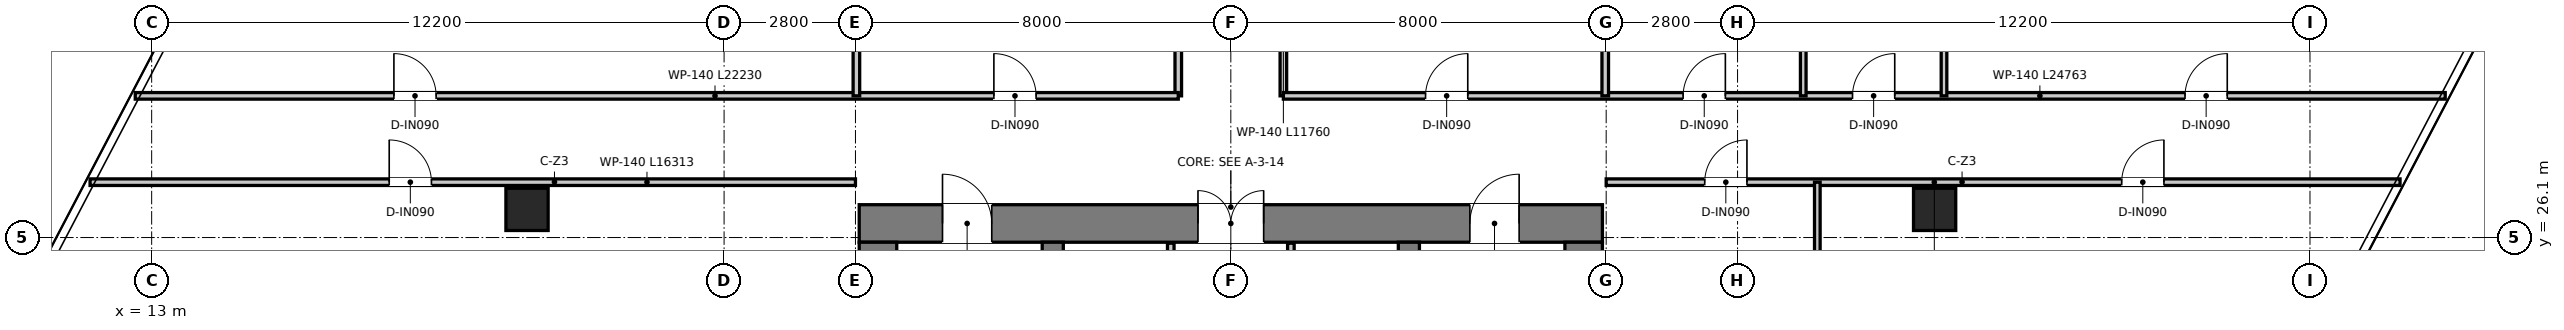
"""IFC4 building model, lengths in metres.
Left out: names, types, materials, properties, quantities, classifications, styles, units other than length and angle.
Written with IfcOpenShell. Run it as: python <this file> out.ifc"""

import sys

from ifc_helpers import new_model, si_unit, direction, frame, frame_2d, origin, origin_2d, place, context, subcontext, project, spatial, rectangle, extrude, source, transform, mapped, element, fill, save


model = new_model("IFC4")
c1 = context("Model", 3, precision=1e-05, world=origin(), true_north=direction((0.0, 1.0)))
c2 = subcontext(c1, "Body", "Model", "MODEL_VIEW")
j1 = project(units=[si_unit("LENGTHUNIT", "METRE"), si_unit("PLANEANGLEUNIT", "RADIAN")], contexts=[c1])
p1 = place(None, origin())
s1 = spatial("IfcSite", under=j1, at=p1, CompositionType="ELEMENT")
p2 = place(p1, origin())
s2 = spatial("IfcBuilding", under=s1, at=p2, CompositionType="ELEMENT")
p3 = place(p2, frame((0.0, 0.0, 154.1)))
s3 = spatial("IfcBuildingStorey", under=s2, at=p3, CompositionType="ELEMENT", Elevation=154.1)
p4 = place(p3, frame((28.08, 26.4, 0.0), z_axis=(0.0, 0.0, 1.0), x_axis=(1.0, 0.0, 0.0)))
e1 = element("IfcWall", 1, at=p4, inside=s3, PredefinedType="SHEAR", context=c2, shape_type="SweptSolid", body=[
    extrude(rectangle(XDim=15.84, YDim=0.8, at=frame_2d((7.92, 0.0))), origin(), (0.0, 0.0, 1.0), 3.95),
])
p5 = place(p4, frame((7.22, 0.0, 0.0)))
e2 = element("IfcOpeningElement", 2, at=p5, cuts=e1, PredefinedType="OPENING", context=c2, shape_type="SweptSolid", body=[
    extrude(rectangle(XDim=1.4, YDim=2.2, at=frame_2d((0.7, 1.1))), frame((0.0, 0.41, 0.0), z_axis=(0.0, -1.0, 0.0), x_axis=(1.0, 0.0, 0.0)), (0.0, 0.0, 1.0), 0.82),
])
p6 = place(p4, frame((1.775, 0.0, 0.0)))
e3 = element("IfcOpeningElement", 3, at=p6, cuts=e1, PredefinedType="OPENING", context=c2, shape_type="SweptSolid", body=[
    extrude(rectangle(XDim=1.05, YDim=2.1, at=frame_2d((0.525, 1.05))), frame((0.0, 0.41, 0.0), z_axis=(0.0, -1.0, 0.0), x_axis=(1.0, 0.0, 0.0)), (0.0, 0.0, 1.0), 0.82),
])
p7 = place(p4, frame((13.015, 0.0, 0.0)))
e4 = element("IfcOpeningElement", 4, at=p7, cuts=e1, PredefinedType="OPENING", context=c2, shape_type="SweptSolid", body=[
    extrude(rectangle(XDim=1.05, YDim=2.1, at=frame_2d((0.525, 1.05))), frame((0.0, 0.41, 0.0), z_axis=(0.0, -1.0, 0.0), x_axis=(1.0, 0.0, 0.0)), (0.0, 0.0, 1.0), 0.82),
])
for number, where, z_axis, x_axis in (
    (5, (28.48, 11.3, 0.0), (0.0, 0.0, 1.0), (0.0, 1.0, 0.0)),
    (6, (43.52, 11.3, 0.0), (0.0, 0.0, 1.0), (0.0, 1.0, 0.0)),
):
    element("IfcWall", number, at=place(p3, frame(where, z_axis=z_axis, x_axis=x_axis)), inside=s3, PredefinedType="SHEAR", context=c2, shape_type="SweptSolid", body=[
        extrude(rectangle(XDim=14.7, YDim=0.8, at=frame_2d((7.35, 0.0))), origin(), (0.0, 0.0, 1.0), 3.95),
    ])
p8 = place(p3, frame((32.205, 13.22, 0.0), z_axis=(0.0, 0.0, 1.0), x_axis=(0.0, 1.0, 0.0)))
e7 = element("IfcWall", 7, at=p8, inside=s3, PredefinedType="SHEAR", context=c2, shape_type="SweptSolid", body=[
    extrude(rectangle(XDim=12.78, YDim=0.45, at=frame_2d((6.39, 0.0))), origin(), (0.0, 0.0, 1.0), 3.95),
])
p9 = place(p8, frame((10.58, 0.0, 0.0)))
e8 = element("IfcOpeningElement", 8, at=p9, cuts=e7, PredefinedType="OPENING", context=c2, shape_type="SweptSolid", body=[
    extrude(rectangle(XDim=1.1, YDim=2.15, at=frame_2d((0.55, 1.075))), frame((0.0, 0.235, 0.0), z_axis=(0.0, -1.0, 0.0), x_axis=(1.0, 0.0, 0.0)), (0.0, 0.0, 1.0), 0.47),
])
p10 = place(p3, frame((39.795, 13.22, 0.0), z_axis=(0.0, 0.0, 1.0), x_axis=(0.0, 1.0, 0.0)))
e9 = element("IfcWall", 9, at=p10, inside=s3, PredefinedType="SHEAR", context=c2, shape_type="SweptSolid", body=[
    extrude(rectangle(XDim=12.78, YDim=0.45, at=frame_2d((6.39, 0.0))), origin(), (0.0, 0.0, 1.0), 3.95),
])
p11 = place(p10, frame((10.58, 0.0, 0.0)))
e10 = element("IfcOpeningElement", 10, at=p11, cuts=e9, PredefinedType="OPENING", context=c2, shape_type="SweptSolid", body=[
    extrude(rectangle(XDim=1.1, YDim=2.15, at=frame_2d((0.55, 1.075))), frame((0.0, 0.235, 0.0), z_axis=(0.0, -1.0, 0.0), x_axis=(1.0, 0.0, 0.0)), (0.0, 0.0, 1.0), 0.47),
])
m1 = source(origin(), c2, "Body", "SweptSolid", [
    extrude(rectangle(XDim=0.9, YDim=0.9, at=origin_2d()), origin(), (0.0, 0.0, 1.0), 3.95),
])
for number, where, z_axis, x_axis in (
    (11, (21.0, 26.7, 0.0), (0.0, 0.0, 1.0), (1.0, 0.0, 0.0)),
    (12, (51.0, 26.7, 0.0), (0.0, 0.0, 1.0), (1.0, 0.0, 0.0)),
):
    element("IfcColumn", number, at=place(p3, frame(where, z_axis=z_axis, x_axis=x_axis)), inside=s3, PredefinedType="COLUMN", context=c2, shape_type="MappedRepresentation", body=[
        mapped(m1, transform((0.0, 0.0, 0.0), x_axis=(1.0, 0.0, 0.0), y_axis=(0.0, 1.0, 0.0), z_axis=(0.0, 0.0, 1.0), scale=1.0)),
    ])
p12 = place(p3, frame((34.72, 20.2, 0.0), z_axis=(0.0, 0.0, 1.0), x_axis=(0.0, 1.0, 0.0)))
e13 = element("IfcWall", 13, at=p12, inside=s3, PredefinedType="PARTITIONING", context=c2, shape_type="SweptSolid", body=[
    extrude(rectangle(XDim=5.78, YDim=0.14, at=frame_2d((2.89, 0.0))), origin(), (0.0, 0.0, 1.0), 2.67),
])
p13 = place(p12, frame((1.05, 0.0, 0.0)))
e14 = element("IfcOpeningElement", 14, at=p13, cuts=e13, PredefinedType="OPENING", context=c2, shape_type="SweptSolid", body=[
    extrude(rectangle(XDim=0.9, YDim=2.1, at=frame_2d((0.45, 1.05))), frame((0.0, 0.08, 0.0), z_axis=(0.0, -1.0, 0.0), x_axis=(1.0, 0.0, 0.0)), (0.0, 0.0, 1.0), 0.16),
])
p14 = place(p3, frame((37.28, 20.2, 0.0), z_axis=(0.0, 0.0, 1.0), x_axis=(0.0, 1.0, 0.0)))
e15 = element("IfcWall", 15, at=p14, inside=s3, PredefinedType="PARTITIONING", context=c2, shape_type="SweptSolid", body=[
    extrude(rectangle(XDim=5.78, YDim=0.14, at=frame_2d((2.89, 0.0))), origin(), (0.0, 0.0, 1.0), 2.67),
])
p15 = place(p14, frame((0.95, 0.0, 0.0)))
e16 = element("IfcOpeningElement", 16, at=p15, cuts=e15, PredefinedType="OPENING", context=c2, shape_type="SweptSolid", body=[
    extrude(rectangle(XDim=1.1, YDim=2.15, at=frame_2d((0.55, 1.075))), frame((0.0, 0.08, 0.0), z_axis=(0.0, -1.0, 0.0), x_axis=(1.0, 0.0, 0.0)), (0.0, 0.0, 1.0), 0.16),
])
p16 = place(p3, frame((34.88, 29.12, 0.0), z_axis=(0.0, 0.0, 1.0), x_axis=(0.0, 1.0, 0.0)))
e17 = element("IfcWall", 17, at=p16, inside=s3, PredefinedType="PARTITIONING", context=c2, shape_type="SweptSolid", body=[
    extrude(rectangle(XDim=11.76, YDim=0.14, at=frame_2d((5.88, 0.0))), origin(), (0.0, 0.0, 1.0), 3.03),
])
p17 = place(p16, frame((3.205, 0.0, 0.0)))
e18 = element("IfcOpeningElement", 18, at=p17, cuts=e17, PredefinedType="OPENING", context=c2, shape_type="SweptSolid", body=[
    extrude(rectangle(XDim=0.95, YDim=2.1, at=frame_2d((0.475, 1.05))), frame((0.0, 0.08, 0.0), z_axis=(0.0, -1.0, 0.0), x_axis=(1.0, 0.0, 0.0)), (0.0, 0.0, 1.0), 0.16),
])
p18 = place(p16, frame((8.02, 0.0, 0.0)))
e19 = element("IfcOpeningElement", 19, at=p18, cuts=e17, PredefinedType="OPENING", context=c2, shape_type="SweptSolid", body=[
    extrude(rectangle(XDim=0.9, YDim=2.1, at=frame_2d((0.45, 1.05))), frame((0.0, 0.08, 0.0), z_axis=(0.0, -1.0, 0.0), x_axis=(1.0, 0.0, 0.0)), (0.0, 0.0, 1.0), 0.16),
])
p19 = place(p3, frame((37.12, 29.12, 0.0), z_axis=(0.0, 0.0, 1.0), x_axis=(0.0, 1.0, 0.0)))
e20 = element("IfcWall", 20, at=p19, inside=s3, PredefinedType="PARTITIONING", context=c2, shape_type="SweptSolid", body=[
    extrude(rectangle(XDim=11.76, YDim=0.14, at=frame_2d((5.88, 0.0))), origin(), (0.0, 0.0, 1.0), 3.03),
])
p20 = place(p19, frame((4.085, 0.0, 0.0)))
e21 = element("IfcOpeningElement", 21, at=p20, cuts=e20, PredefinedType="OPENING", context=c2, shape_type="SweptSolid", body=[
    extrude(rectangle(XDim=0.95, YDim=2.1, at=frame_2d((0.475, 1.05))), frame((0.0, 0.08, 0.0), z_axis=(0.0, -1.0, 0.0), x_axis=(1.0, 0.0, 0.0)), (0.0, 0.0, 1.0), 0.16),
])
p21 = place(p19, frame((8.02, 0.0, 0.0)))
e22 = element("IfcOpeningElement", 22, at=p21, cuts=e20, PredefinedType="OPENING", context=c2, shape_type="SweptSolid", body=[
    extrude(rectangle(XDim=0.9, YDim=2.1, at=frame_2d((0.45, 1.05))), frame((0.0, 0.08, 0.0), z_axis=(0.0, -1.0, 0.0), x_axis=(1.0, 0.0, 0.0)), (0.0, 0.0, 1.0), 0.16),
])
p22 = place(p3, frame((12.65, 29.12, 0.0), z_axis=(0.0, 0.0, 1.0), x_axis=(1.0, 0.0, 0.0)))
e23 = element("IfcWall", 23, at=p22, inside=s3, PredefinedType="PARTITIONING", context=c2, shape_type="SweptSolid", body=[
    extrude(rectangle(XDim=22.229, YDim=0.14, at=frame_2d((11.115, 0.0))), origin(), (0.0, 0.0, 1.0), 3.03),
])
p23 = place(p22, frame((18.3, 0.0, 0.0)))
e24 = element("IfcOpeningElement", 24, at=p23, cuts=e23, PredefinedType="OPENING", context=c2, shape_type="SweptSolid", body=[
    extrude(rectangle(XDim=0.9, YDim=2.1, at=frame_2d((0.45, 1.05))), frame((0.0, 0.08, 0.0), z_axis=(0.0, -1.0, 0.0), x_axis=(1.0, 0.0, 0.0)), (0.0, 0.0, 1.0), 0.16),
])
p24 = place(p22, frame((5.513, 0.0, 0.0)))
e25 = element("IfcOpeningElement", 25, at=p24, cuts=e23, PredefinedType="OPENING", context=c2, shape_type="SweptSolid", body=[
    extrude(rectangle(XDim=0.9, YDim=2.1, at=frame_2d((0.45, 1.05))), frame((0.0, 0.08, 0.0), z_axis=(0.0, -1.0, 0.0), x_axis=(1.0, 0.0, 0.0)), (0.0, 0.0, 1.0), 0.16),
])
p25 = place(p3, frame((37.12, 29.12, 0.0), z_axis=(0.0, 0.0, 1.0), x_axis=(1.0, 0.0, 0.0)))
e26 = element("IfcWall", 26, at=p25, inside=s3, PredefinedType="PARTITIONING", context=c2, shape_type="SweptSolid", body=[
    extrude(rectangle(XDim=24.763, YDim=0.14, at=frame_2d((12.381, 0.0))), origin(), (0.0, 0.0, 1.0), 3.03),
])
p26 = place(p25, frame((3.03, 0.0, 0.0)))
e27 = element("IfcOpeningElement", 27, at=p26, cuts=e26, PredefinedType="OPENING", context=c2, shape_type="SweptSolid", body=[
    extrude(rectangle(XDim=0.9, YDim=2.1, at=frame_2d((0.45, 1.05))), frame((0.0, 0.08, 0.0), z_axis=(0.0, -1.0, 0.0), x_axis=(1.0, 0.0, 0.0)), (0.0, 0.0, 1.0), 0.16),
])
p27 = place(p25, frame((8.52, 0.0, 0.0)))
e28 = element("IfcOpeningElement", 28, at=p27, cuts=e26, PredefinedType="OPENING", context=c2, shape_type="SweptSolid", body=[
    extrude(rectangle(XDim=0.9, YDim=2.1, at=frame_2d((0.45, 1.05))), frame((0.0, 0.08, 0.0), z_axis=(0.0, -1.0, 0.0), x_axis=(1.0, 0.0, 0.0)), (0.0, 0.0, 1.0), 0.16),
])
p28 = place(p25, frame((12.13, 0.0, 0.0)))
e29 = element("IfcOpeningElement", 29, at=p28, cuts=e26, PredefinedType="OPENING", context=c2, shape_type="SweptSolid", body=[
    extrude(rectangle(XDim=0.9, YDim=2.1, at=frame_2d((0.45, 1.05))), frame((0.0, 0.08, 0.0), z_axis=(0.0, -1.0, 0.0), x_axis=(1.0, 0.0, 0.0)), (0.0, 0.0, 1.0), 0.16),
])
p29 = place(p25, frame((19.217, 0.0, 0.0)))
e30 = element("IfcOpeningElement", 30, at=p29, cuts=e26, PredefinedType="OPENING", context=c2, shape_type="SweptSolid", body=[
    extrude(rectangle(XDim=0.9, YDim=2.1, at=frame_2d((0.45, 1.05))), frame((0.0, 0.08, 0.0), z_axis=(0.0, -1.0, 0.0), x_axis=(1.0, 0.0, 0.0)), (0.0, 0.0, 1.0), 0.16),
])
p30 = place(p3, frame((11.687, 27.28, 0.0), z_axis=(0.0, 0.0, 1.0), x_axis=(1.0, 0.0, 0.0)))
e31 = element("IfcWall", 31, at=p30, inside=s3, PredefinedType="PARTITIONING", context=c2, shape_type="SweptSolid", body=[
    extrude(rectangle(XDim=16.313, YDim=0.14, at=frame_2d((8.156, 0.0))), origin(), (0.0, 0.0, 1.0), 3.03),
])
p31 = place(p30, frame((6.376, 0.0, 0.0)))
e32 = element("IfcOpeningElement", 32, at=p31, cuts=e31, PredefinedType="OPENING", context=c2, shape_type="SweptSolid", body=[
    extrude(rectangle(XDim=0.9, YDim=2.1, at=frame_2d((0.45, 1.05))), frame((0.0, 0.08, 0.0), z_axis=(0.0, -1.0, 0.0), x_axis=(1.0, 0.0, 0.0)), (0.0, 0.0, 1.0), 0.16),
])
p32 = place(p3, frame((44.0, 27.28, 0.0), z_axis=(0.0, 0.0, 1.0), x_axis=(1.0, 0.0, 0.0)))
e33 = element("IfcWall", 33, at=p32, inside=s3, PredefinedType="PARTITIONING", context=c2, shape_type="SweptSolid", body=[
    extrude(rectangle(XDim=16.92, YDim=0.14, at=frame_2d((8.46, 0.0))), origin(), (0.0, 0.0, 1.0), 3.03),
])
p33 = place(p32, frame((2.1, 0.0, 0.0)))
e34 = element("IfcOpeningElement", 34, at=p33, cuts=e33, PredefinedType="OPENING", context=c2, shape_type="SweptSolid", body=[
    extrude(rectangle(XDim=0.9, YDim=2.1, at=frame_2d((0.45, 1.05))), frame((0.0, 0.08, 0.0), z_axis=(0.0, -1.0, 0.0), x_axis=(1.0, 0.0, 0.0)), (0.0, 0.0, 1.0), 0.16),
])
p34 = place(p32, frame((10.987, 0.0, 0.0)))
e35 = element("IfcOpeningElement", 35, at=p34, cuts=e33, PredefinedType="OPENING", context=c2, shape_type="SweptSolid", body=[
    extrude(rectangle(XDim=0.9, YDim=2.1, at=frame_2d((0.45, 1.05))), frame((0.0, 0.08, 0.0), z_axis=(0.0, -1.0, 0.0), x_axis=(1.0, 0.0, 0.0)), (0.0, 0.0, 1.0), 0.16),
])
for number, where, z_axis, x_axis in (
    (36, (28.02, 29.12, 0.0), (0.0, 0.0, 1.0), (0.0, 1.0, 0.0)),
    (37, (43.98, 29.12, 0.0), (0.0, 0.0, 1.0), (0.0, 1.0, 0.0)),
):
    element("IfcWall", number, at=place(p3, frame(where, z_axis=z_axis, x_axis=x_axis)), inside=s3, PredefinedType="PARTITIONING", context=c2, shape_type="SweptSolid", body=[
        extrude(rectangle(XDim=5.46, YDim=0.14, at=frame_2d((2.73, 0.0))), origin(), (0.0, 0.0, 1.0), 3.31),
    ])
p35 = place(p3, frame((48.2, 29.12, 0.0), z_axis=(0.0, 0.0, 1.0), x_axis=(0.0, 1.0, 0.0)))
e38 = element("IfcWall", 38, at=p35, inside=s3, PredefinedType="PARTITIONING", context=c2, shape_type="SweptSolid", body=[
    extrude(rectangle(XDim=15.811, YDim=0.12, at=frame_2d((7.906, 0.0))), origin(), (0.0, 0.0, 1.0), 3.08),
])
p36 = place(p3, frame((51.2, 29.12, 0.0), z_axis=(0.0, 0.0, 1.0), x_axis=(0.0, 1.0, 0.0)))
e39 = element("IfcWall", 39, at=p36, inside=s3, PredefinedType="PARTITIONING", context=c2, shape_type="SweptSolid", body=[
    extrude(rectangle(XDim=14.241, YDim=0.12, at=frame_2d((7.121, 0.0))), origin(), (0.0, 0.0, 1.0), 3.28),
])
p37 = place(p3, frame((48.5, 3.548, 0.0), z_axis=(0.0, 0.0, 1.0), x_axis=(0.0, 1.0, 0.0)))
e40 = element("IfcWall", 40, at=p37, inside=s3, PredefinedType="PARTITIONING", context=c2, shape_type="SweptSolid", body=[
    extrude(rectangle(XDim=23.732, YDim=0.12, at=frame_2d((11.866, 0.0))), origin(), (0.0, 0.0, 1.0), 3.08),
])
p38 = place(p5, origin())
e41 = element("IfcDoor", 41, at=p38, inside=s3, OperationType="DOUBLE_DOOR_SINGLE_SWING", PredefinedType="DOOR", context=c2, shape_type="SweptSolid", body=[
    extrude(rectangle(XDim=1.4, YDim=2.2, at=frame_2d((0.7, 1.1))), frame((0.0, 0.025, 0.0), z_axis=(0.0, -1.0, 0.0), x_axis=(1.0, 0.0, 0.0)), (0.0, 0.0, 1.0), 0.05),
])
fill(e2, e41)
p39 = place(p6, origin())
e42 = element("IfcDoor", 42, at=p39, inside=s3, OperationType="SINGLE_SWING_LEFT", PredefinedType="DOOR", context=c2, shape_type="SweptSolid", body=[
    extrude(rectangle(XDim=1.05, YDim=2.1, at=frame_2d((0.525, 1.05))), frame((0.0, 0.025, 0.0), z_axis=(0.0, -1.0, 0.0), x_axis=(1.0, 0.0, 0.0)), (0.0, 0.0, 1.0), 0.05),
])
fill(e3, e42)
p40 = place(p7, origin())
e43 = element("IfcDoor", 43, at=p40, inside=s3, OperationType="SINGLE_SWING_RIGHT", PredefinedType="DOOR", context=c2, shape_type="SweptSolid", body=[
    extrude(rectangle(XDim=1.05, YDim=2.1, at=frame_2d((0.525, 1.05))), frame((0.0, 0.025, 0.0), z_axis=(0.0, -1.0, 0.0), x_axis=(1.0, 0.0, 0.0)), (0.0, 0.0, 1.0), 0.05),
])
fill(e4, e43)
p41 = place(p23, origin())
e44 = element("IfcDoor", 44, at=p41, inside=s3, OperationType="SINGLE_SWING_LEFT", PredefinedType="DOOR", context=c2, shape_type="SweptSolid", body=[
    extrude(rectangle(XDim=0.9, YDim=2.1, at=frame_2d((0.45, 1.05))), frame((0.0, 0.025, 0.0), z_axis=(0.0, -1.0, 0.0), x_axis=(1.0, 0.0, 0.0)), (0.0, 0.0, 1.0), 0.05),
])
fill(e24, e44)
p42 = place(p26, origin())
e45 = element("IfcDoor", 45, at=p42, inside=s3, OperationType="SINGLE_SWING_RIGHT", PredefinedType="DOOR", context=c2, shape_type="SweptSolid", body=[
    extrude(rectangle(XDim=0.9, YDim=2.1, at=frame_2d((0.45, 1.05))), frame((0.0, 0.025, 0.0), z_axis=(0.0, -1.0, 0.0), x_axis=(1.0, 0.0, 0.0)), (0.0, 0.0, 1.0), 0.05),
])
fill(e27, e45)
p43 = place(p24, origin())
e46 = element("IfcDoor", 46, at=p43, inside=s3, OperationType="SINGLE_SWING_LEFT", PredefinedType="DOOR", context=c2, shape_type="SweptSolid", body=[
    extrude(rectangle(XDim=0.9, YDim=2.1, at=frame_2d((0.45, 1.05))), frame((0.0, 0.025, 0.0), z_axis=(0.0, -1.0, 0.0), x_axis=(1.0, 0.0, 0.0)), (0.0, 0.0, 1.0), 0.05),
])
fill(e25, e46)
p44 = place(p27, origin())
e47 = element("IfcDoor", 47, at=p44, inside=s3, OperationType="SINGLE_SWING_RIGHT", PredefinedType="DOOR", context=c2, shape_type="SweptSolid", body=[
    extrude(rectangle(XDim=0.9, YDim=2.1, at=frame_2d((0.45, 1.05))), frame((0.0, 0.025, 0.0), z_axis=(0.0, -1.0, 0.0), x_axis=(1.0, 0.0, 0.0)), (0.0, 0.0, 1.0), 0.05),
])
fill(e28, e47)
p45 = place(p28, origin())
e48 = element("IfcDoor", 48, at=p45, inside=s3, OperationType="SINGLE_SWING_RIGHT", PredefinedType="DOOR", context=c2, shape_type="SweptSolid", body=[
    extrude(rectangle(XDim=0.9, YDim=2.1, at=frame_2d((0.45, 1.05))), frame((0.0, 0.025, 0.0), z_axis=(0.0, -1.0, 0.0), x_axis=(1.0, 0.0, 0.0)), (0.0, 0.0, 1.0), 0.05),
])
fill(e29, e48)
p46 = place(p29, origin())
e49 = element("IfcDoor", 49, at=p46, inside=s3, OperationType="SINGLE_SWING_RIGHT", PredefinedType="DOOR", context=c2, shape_type="SweptSolid", body=[
    extrude(rectangle(XDim=0.9, YDim=2.1, at=frame_2d((0.45, 1.05))), frame((0.0, 0.025, 0.0), z_axis=(0.0, -1.0, 0.0), x_axis=(1.0, 0.0, 0.0)), (0.0, 0.0, 1.0), 0.05),
])
fill(e30, e49)
p47 = place(p31, origin())
e50 = element("IfcDoor", 50, at=p47, inside=s3, OperationType="SINGLE_SWING_LEFT", PredefinedType="DOOR", context=c2, shape_type="SweptSolid", body=[
    extrude(rectangle(XDim=0.9, YDim=2.1, at=frame_2d((0.45, 1.05))), frame((0.0, 0.025, 0.0), z_axis=(0.0, -1.0, 0.0), x_axis=(1.0, 0.0, 0.0)), (0.0, 0.0, 1.0), 0.05),
])
fill(e32, e50)
p48 = place(p33, origin())
e51 = element("IfcDoor", 51, at=p48, inside=s3, OperationType="SINGLE_SWING_RIGHT", PredefinedType="DOOR", context=c2, shape_type="SweptSolid", body=[
    extrude(rectangle(XDim=0.9, YDim=2.1, at=frame_2d((0.45, 1.05))), frame((0.0, 0.025, 0.0), z_axis=(0.0, -1.0, 0.0), x_axis=(1.0, 0.0, 0.0)), (0.0, 0.0, 1.0), 0.05),
])
fill(e34, e51)
p49 = place(p34, origin())
e52 = element("IfcDoor", 52, at=p49, inside=s3, OperationType="SINGLE_SWING_RIGHT", PredefinedType="DOOR", context=c2, shape_type="SweptSolid", body=[
    extrude(rectangle(XDim=0.9, YDim=2.1, at=frame_2d((0.45, 1.05))), frame((0.0, 0.025, 0.0), z_axis=(0.0, -1.0, 0.0), x_axis=(1.0, 0.0, 0.0)), (0.0, 0.0, 1.0), 0.05),
])
fill(e35, e52)
save(model, sys.argv[1])
